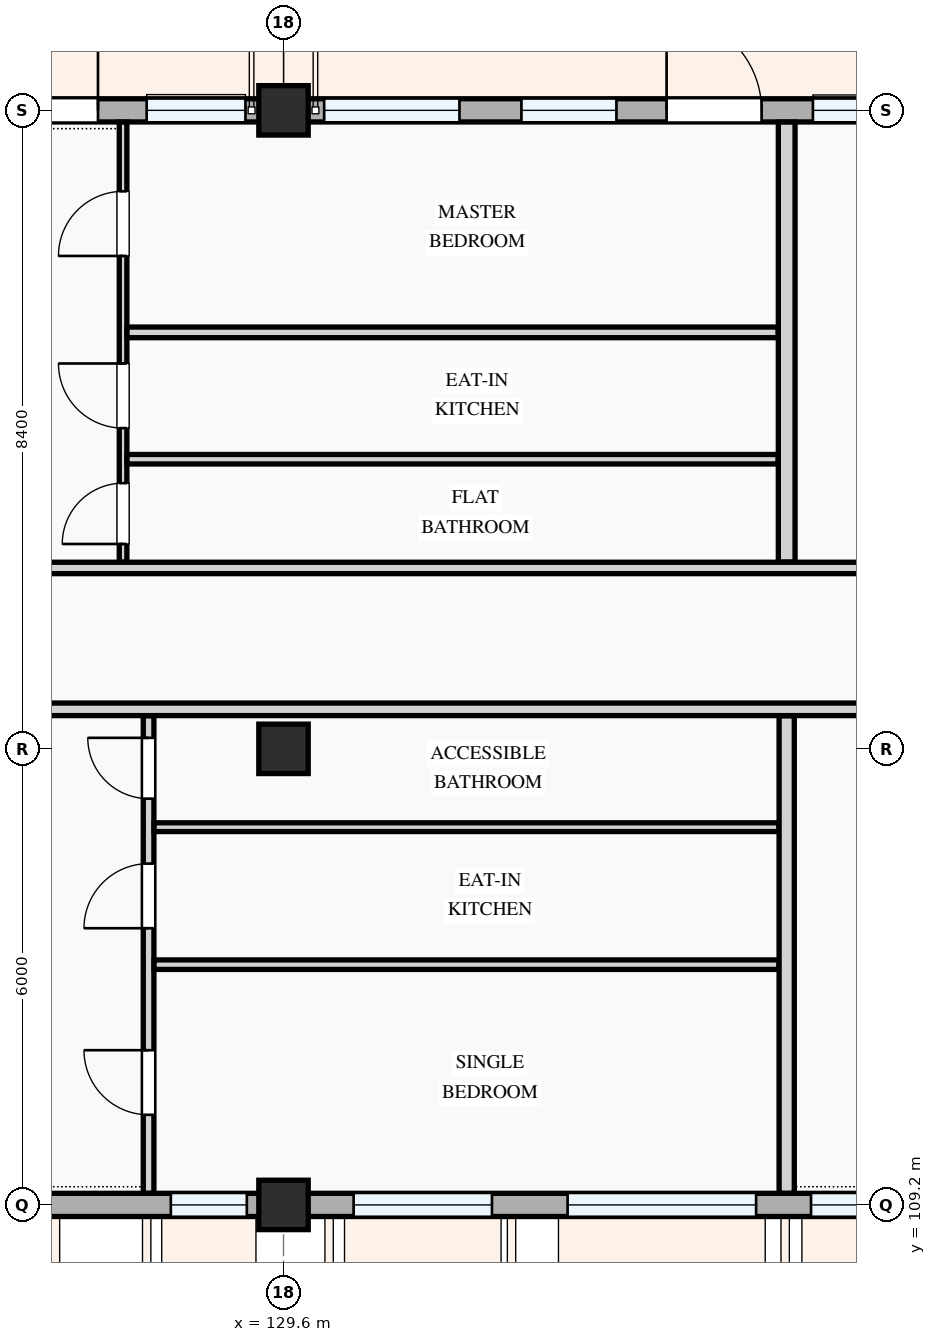
"""IFC4 building model, lengths in metres.
Left out: names, types, materials, properties, quantities, classifications, styles, units other than length and angle.
Written with IfcOpenShell. Run it as: python <this file> out.ifc"""

import sys

from ifc_helpers import new_model, si_unit, direction, frame, frame_2d, origin, origin_2d, place, context, subcontext, project, spatial, rectangle, extrude, element, fill, save


model = new_model("IFC4")
c1 = context("Model", 3, precision=1e-05, world=origin(), true_north=direction((0.0, 1.0)))
c2 = subcontext(c1, "Body", "Model", "MODEL_VIEW")
j1 = project(units=[si_unit("LENGTHUNIT", "METRE"), si_unit("PLANEANGLEUNIT", "RADIAN")], contexts=[c1])
p1 = place(None, origin())
s1 = spatial("IfcSite", under=j1, at=p1, CompositionType="ELEMENT")
p2 = place(p1, origin())
s2 = spatial("IfcBuilding", under=s1, at=p2, CompositionType="ELEMENT")
p3 = place(p2, frame((0.0, 0.0, 21.3)))
s3 = spatial("IfcBuildingStorey", under=s2, at=p3, CompositionType="ELEMENT", Elevation=21.3)
for number, where, z_axis, x_axis in (
    (1, (129.6, 109.2, 0.0), (0.0, 0.0, 1.0), (1.0, 0.0, 0.0)),
    (2, (129.6, 115.2, 0.0), (0.0, 0.0, 1.0), (1.0, 0.0, 0.0)),
    (3, (129.6, 123.6, 0.0), (0.0, 0.0, 1.0), (1.0, 0.0, 0.0)),
):
    element("IfcColumn", number, at=place(p3, frame(where, z_axis=z_axis, x_axis=x_axis)), inside=s3, PredefinedType="COLUMN", context=c2, shape_type="SweptSolid", body=[
        extrude(rectangle(XDim=0.65, YDim=0.65, at=origin_2d()), origin(), (0.0, 0.0, 1.0), 3.3),
    ])
p4 = place(p3, frame((138.0, 123.6, 0.0), z_axis=(0.0, 0.0, 1.0), x_axis=(-1.0, 0.0, 0.0)))
e4 = element("IfcWall", 4, at=p4, inside=s3, PredefinedType="STANDARD", context=c2, shape_type="SweptSolid", body=[
    extrude(rectangle(XDim=8.4, YDim=0.305, at=frame_2d((4.2, 0.0))), origin(), (0.0, 0.0, 1.0), 2.345),
])
p5 = place(p4, frame((2.11, 0.0, 0.0)))
e5 = element("IfcOpeningElement", 5, at=p5, cuts=e4, PredefinedType="OPENING", context=c2, shape_type="SweptSolid", body=[
    extrude(rectangle(XDim=1.25, YDim=2.2, at=frame_2d((0.625, 1.1))), frame((0.0, 0.163, 0.0), z_axis=(0.0, -1.0, 0.0), x_axis=(1.0, 0.0, 0.0)), (0.0, 0.0, 1.0), 0.325),
])
p6 = place(p4, frame((0.535, 0.0, 0.78)))
e6 = element("IfcOpeningElement", 6, at=p6, cuts=e4, PredefinedType="OPENING", context=c2, shape_type="SweptSolid", body=[
    extrude(rectangle(XDim=0.9, YDim=1.2, at=frame_2d((0.45, 0.6))), frame((0.0, 0.163, 0.0), z_axis=(0.0, -1.0, 0.0), x_axis=(1.0, 0.0, 0.0)), (0.0, 0.0, 1.0), 0.325),
])
p7 = place(p4, frame((4.02, 0.0, 0.78)))
e7 = element("IfcOpeningElement", 7, at=p7, cuts=e4, PredefinedType="OPENING", context=c2, shape_type="SweptSolid", body=[
    extrude(rectangle(XDim=1.25, YDim=1.3, at=frame_2d((0.625, 0.65))), frame((0.0, 0.163, 0.0), z_axis=(0.0, -1.0, 0.0), x_axis=(1.0, 0.0, 0.0)), (0.0, 0.0, 1.0), 0.325),
])
p8 = place(p4, frame((6.085, 0.0, 0.78)))
e8 = element("IfcOpeningElement", 8, at=p8, cuts=e4, PredefinedType="OPENING", context=c2, shape_type="SweptSolid", body=[
    extrude(rectangle(XDim=1.78, YDim=1.42, at=frame_2d((0.89, 0.71))), frame((0.0, 0.163, 0.0), z_axis=(0.0, -1.0, 0.0), x_axis=(1.0, 0.0, 0.0)), (0.0, 0.0, 1.0), 0.325),
])
p9 = place(p3, frame((129.6, 123.6, 0.0), z_axis=(0.0, 0.0, 1.0), x_axis=(-1.0, 0.0, 0.0)))
e9 = element("IfcWall", 9, at=p9, inside=s3, PredefinedType="STANDARD", context=c2, shape_type="SweptSolid", body=[
    extrude(rectangle(XDim=6.0, YDim=0.305, at=frame_2d((3.0, 0.0))), origin(), (0.0, 0.0, 1.0), 2.445),
])
p10 = place(p9, frame((2.441, 0.0, 0.0)))
e10 = element("IfcOpeningElement", 10, at=p10, cuts=e9, PredefinedType="OPENING", context=c2, shape_type="SweptSolid", body=[
    extrude(rectangle(XDim=1.3, YDim=2.15, at=frame_2d((0.65, 1.075))), frame((0.0, 0.163, 0.0), z_axis=(0.0, -1.0, 0.0), x_axis=(1.0, 0.0, 0.0)), (0.0, 0.0, 1.0), 0.325),
])
p11 = place(p9, frame((0.5, 0.0, 0.78)))
e11 = element("IfcOpeningElement", 11, at=p11, cuts=e9, PredefinedType="OPENING", context=c2, shape_type="SweptSolid", body=[
    extrude(rectangle(XDim=1.3, YDim=1.4, at=frame_2d((0.65, 0.7))), frame((0.0, 0.163, 0.0), z_axis=(0.0, -1.0, 0.0), x_axis=(1.0, 0.0, 0.0)), (0.0, 0.0, 1.0), 0.325),
])
p12 = place(p9, frame((4.2, 0.0, 0.78)))
e12 = element("IfcOpeningElement", 12, at=p12, cuts=e9, PredefinedType="OPENING", context=c2, shape_type="SweptSolid", body=[
    extrude(rectangle(XDim=1.2, YDim=1.5, at=frame_2d((0.6, 0.75))), frame((0.0, 0.163, 0.0), z_axis=(0.0, -1.0, 0.0), x_axis=(1.0, 0.0, 0.0)), (0.0, 0.0, 1.0), 0.325),
])
p13 = place(p3, frame((123.6, 109.2, 0.0), z_axis=(0.0, 0.0, 1.0), x_axis=(1.0, 0.0, 0.0)))
e13 = element("IfcWall", 13, at=p13, inside=s3, PredefinedType="STANDARD", context=c2, shape_type="SweptSolid", body=[
    extrude(rectangle(XDim=6.0, YDim=0.305, at=frame_2d((3.0, 0.0))), origin(), (0.0, 0.0, 1.0), 2.475),
])
p14 = place(p13, frame((1.683, 0.0, 0.78)))
e14 = element("IfcOpeningElement", 14, at=p14, cuts=e13, PredefinedType="OPENING", context=c2, shape_type="SweptSolid", body=[
    extrude(rectangle(XDim=1.05, YDim=1.2, at=frame_2d((0.525, 0.6))), frame((0.0, 0.163, 0.0), z_axis=(0.0, -1.0, 0.0), x_axis=(1.0, 0.0, 0.0)), (0.0, 0.0, 1.0), 0.325),
])
p15 = place(p13, frame((4.518, 0.0, 0.78)))
e15 = element("IfcOpeningElement", 15, at=p15, cuts=e13, PredefinedType="OPENING", context=c2, shape_type="SweptSolid", body=[
    extrude(rectangle(XDim=1.0, YDim=1.25, at=frame_2d((0.5, 0.625))), frame((0.0, 0.163, 0.0), z_axis=(0.0, -1.0, 0.0), x_axis=(1.0, 0.0, 0.0)), (0.0, 0.0, 1.0), 0.325),
])
p16 = place(p3, frame((129.6, 109.2, 0.0), z_axis=(0.0, 0.0, 1.0), x_axis=(1.0, 0.0, 0.0)))
e16 = element("IfcWall", 16, at=p16, inside=s3, PredefinedType="STANDARD", context=c2, shape_type="SweptSolid", body=[
    extrude(rectangle(XDim=8.4, YDim=0.305, at=frame_2d((4.2, 0.0))), origin(), (0.0, 0.0, 1.0), 2.375),
])
p17 = place(p16, frame((0.923, 0.0, 0.78)))
e17 = element("IfcOpeningElement", 17, at=p17, cuts=e16, PredefinedType="OPENING", context=c2, shape_type="SweptSolid", body=[
    extrude(rectangle(XDim=1.82, YDim=1.46, at=frame_2d((0.91, 0.73))), frame((0.0, 0.163, 0.0), z_axis=(0.0, -1.0, 0.0), x_axis=(1.0, 0.0, 0.0)), (0.0, 0.0, 1.0), 0.325),
])
p18 = place(p16, frame((3.738, 0.0, 0.78)))
e18 = element("IfcOpeningElement", 18, at=p18, cuts=e16, PredefinedType="OPENING", context=c2, shape_type="SweptSolid", body=[
    extrude(rectangle(XDim=2.48, YDim=1.46, at=frame_2d((1.24, 0.73))), frame((0.0, 0.163, 0.0), z_axis=(0.0, -1.0, 0.0), x_axis=(1.0, 0.0, 0.0)), (0.0, 0.0, 1.0), 0.325),
])
p19 = place(p16, frame((6.94, 0.0, 0.78)))
e19 = element("IfcOpeningElement", 19, at=p19, cuts=e16, PredefinedType="OPENING", context=c2, shape_type="SweptSolid", body=[
    extrude(rectangle(XDim=0.95, YDim=1.15, at=frame_2d((0.475, 0.575))), frame((0.0, 0.163, 0.0), z_axis=(0.0, -1.0, 0.0), x_axis=(1.0, 0.0, 0.0)), (0.0, 0.0, 1.0), 0.325),
])
p20 = place(p3, frame((127.825, 109.354, 0.0), z_axis=(0.0, 0.0, 1.0), x_axis=(0.0, 1.0, 0.0)))
e20 = element("IfcWall", 20, at=p20, inside=s3, PredefinedType="PARTITIONING", context=c2, shape_type="SweptSolid", body=[
    extrude(rectangle(XDim=6.281, YDim=0.14, at=frame_2d((3.141, 0.0))), origin(), (0.0, 0.0, 1.0), 3.0),
])
p21 = place(p20, frame((1.031, 0.0, 0.0)))
e21 = element("IfcOpeningElement", 21, at=p21, cuts=e20, PredefinedType="OPENING", context=c2, shape_type="SweptSolid", body=[
    extrude(rectangle(XDim=0.85, YDim=2.1, at=frame_2d((0.425, 1.05))), frame((0.0, 0.08, 0.0), z_axis=(0.0, -1.0, 0.0), x_axis=(1.0, 0.0, 0.0)), (0.0, 0.0, 1.0), 0.16),
])
p22 = place(p20, frame((3.486, 0.0, 0.0)))
e22 = element("IfcOpeningElement", 22, at=p22, cuts=e20, PredefinedType="OPENING", context=c2, shape_type="SweptSolid", body=[
    extrude(rectangle(XDim=0.85, YDim=2.1, at=frame_2d((0.425, 1.05))), frame((0.0, 0.08, 0.0), z_axis=(0.0, -1.0, 0.0), x_axis=(1.0, 0.0, 0.0)), (0.0, 0.0, 1.0), 0.16),
])
p23 = place(p20, frame((5.19, 0.0, 0.0)))
e23 = element("IfcOpeningElement", 23, at=p23, cuts=e20, PredefinedType="OPENING", context=c2, shape_type="SweptSolid", body=[
    extrude(rectangle(XDim=0.8, YDim=2.1, at=frame_2d((0.4, 1.05))), frame((0.0, 0.08, 0.0), z_axis=(0.0, -1.0, 0.0), x_axis=(1.0, 0.0, 0.0)), (0.0, 0.0, 1.0), 0.16),
])
p24 = place(p3, frame((127.897, 112.361, 0.0), z_axis=(0.0, 0.0, 1.0), x_axis=(1.0, 0.0, 0.0)))
e24 = element("IfcWall", 24, at=p24, inside=s3, PredefinedType="PARTITIONING", context=c2, shape_type="SweptSolid", body=[
    extrude(rectangle(XDim=8.221, YDim=0.125, at=frame_2d((4.11, 0.0))), origin(), (0.0, 0.0, 1.0), 3.0),
])
p25 = place(p3, frame((127.897, 114.17, 0.0), z_axis=(0.0, 0.0, 1.0), x_axis=(1.0, 0.0, 0.0)))
e25 = element("IfcWall", 25, at=p25, inside=s3, PredefinedType="PARTITIONING", context=c2, shape_type="SweptSolid", body=[
    extrude(rectangle(XDim=8.221, YDim=0.115, at=frame_2d((4.11, 0.0))), origin(), (0.0, 0.0, 1.0), 3.0),
])
p26 = place(p3, frame((127.489, 117.657, 0.0), z_axis=(0.0, 0.0, 1.0), x_axis=(0.0, 1.0, 0.0)))
e26 = element("IfcWall", 26, at=p26, inside=s3, PredefinedType="PARTITIONING", context=c2, shape_type="SweptSolid", body=[
    extrude(rectangle(XDim=5.789, YDim=0.1, at=frame_2d((2.894, 0.0))), origin(), (0.0, 0.0, 1.0), 3.0),
])
p27 = place(p26, frame((0.238, 0.0, 0.0)))
e27 = element("IfcOpeningElement", 27, at=p27, cuts=e26, PredefinedType="OPENING", context=c2, shape_type="SweptSolid", body=[
    extrude(rectangle(XDim=0.8, YDim=2.1, at=frame_2d((0.4, 1.05))), frame((0.0, 0.06, 0.0), z_axis=(0.0, -1.0, 0.0), x_axis=(1.0, 0.0, 0.0)), (0.0, 0.0, 1.0), 0.12),
])
p28 = place(p26, frame((1.763, 0.0, 0.0)))
e28 = element("IfcOpeningElement", 28, at=p28, cuts=e26, PredefinedType="OPENING", context=c2, shape_type="SweptSolid", body=[
    extrude(rectangle(XDim=0.85, YDim=2.1, at=frame_2d((0.425, 1.05))), frame((0.0, 0.06, 0.0), z_axis=(0.0, -1.0, 0.0), x_axis=(1.0, 0.0, 0.0)), (0.0, 0.0, 1.0), 0.12),
])
p29 = place(p26, frame((4.028, 0.0, 0.0)))
e29 = element("IfcOpeningElement", 29, at=p29, cuts=e26, PredefinedType="OPENING", context=c2, shape_type="SweptSolid", body=[
    extrude(rectangle(XDim=0.85, YDim=2.1, at=frame_2d((0.425, 1.05))), frame((0.0, 0.06, 0.0), z_axis=(0.0, -1.0, 0.0), x_axis=(1.0, 0.0, 0.0)), (0.0, 0.0, 1.0), 0.12),
])
p30 = place(p3, frame((127.541, 120.679, 0.0), z_axis=(0.0, 0.0, 1.0), x_axis=(1.0, 0.0, 0.0)))
e30 = element("IfcWall", 30, at=p30, inside=s3, PredefinedType="PARTITIONING", context=c2, shape_type="SweptSolid", body=[
    extrude(rectangle(XDim=8.567, YDim=0.14, at=frame_2d((4.283, 0.0))), origin(), (0.0, 0.0, 1.0), 3.0),
])
p31 = place(p3, frame((127.541, 119.01, 0.0), z_axis=(0.0, 0.0, 1.0), x_axis=(1.0, 0.0, 0.0)))
e31 = element("IfcWall", 31, at=p31, inside=s3, PredefinedType="PARTITIONING", context=c2, shape_type="SweptSolid", body=[
    extrude(rectangle(XDim=8.567, YDim=0.125, at=frame_2d((4.283, 0.0))), origin(), (0.0, 0.0, 1.0), 3.0),
])
p32 = place(p3, frame((136.22, 109.354, 0.0), z_axis=(0.0, 0.0, 1.0), x_axis=(0.0, 1.0, 0.0)))
e32 = element("IfcWall", 32, at=p32, inside=s3, PredefinedType="PARTITIONING", context=c2, shape_type="SweptSolid", body=[
    extrude(rectangle(XDim=6.281, YDim=0.2, at=frame_2d((3.141, 0.0))), origin(), (0.0, 0.0, 1.0), 3.0),
])
p33 = place(p3, frame((136.22, 117.657, 0.0), z_axis=(0.0, 0.0, 1.0), x_axis=(0.0, 1.0, 0.0)))
e33 = element("IfcWall", 33, at=p33, inside=s3, PredefinedType="PARTITIONING", context=c2, shape_type="SweptSolid", body=[
    extrude(rectangle(XDim=5.789, YDim=0.22, at=frame_2d((2.894, 0.0))), origin(), (0.0, 0.0, 1.0), 3.0),
])
p34 = place(p3, frame((80.554, 115.72, 0.0), z_axis=(0.0, 0.0, 1.0), x_axis=(1.0, 0.0, 0.0)))
e34 = element("IfcWall", 34, at=p34, inside=s3, PredefinedType="PARTITIONING", context=c2, shape_type="SweptSolid", body=[
    extrude(rectangle(XDim=69.496, YDim=0.165, at=frame_2d((34.748, 0.0))), origin(), (0.0, 0.0, 1.0), 3.0),
])
p35 = place(p34, frame((2.359, 0.0, 0.0)))
e35 = element("IfcOpeningElement", 35, at=p35, cuts=e34, PredefinedType="OPENING", context=c2, shape_type="SweptSolid", body=[
    extrude(rectangle(XDim=0.96, YDim=2.12, at=frame_2d((0.48, 1.06))), frame((0.0, 0.093, 0.0), z_axis=(0.0, -1.0, 0.0), x_axis=(1.0, 0.0, 0.0)), (0.0, 0.0, 1.0), 0.185),
])
p36 = place(p34, frame((23.96, 0.0, 0.0)))
e36 = element("IfcOpeningElement", 36, at=p36, cuts=e34, PredefinedType="OPENING", context=c2, shape_type="SweptSolid", body=[
    extrude(rectangle(XDim=0.92, YDim=2.1, at=frame_2d((0.46, 1.05))), frame((0.0, 0.093, 0.0), z_axis=(0.0, -1.0, 0.0), x_axis=(1.0, 0.0, 0.0)), (0.0, 0.0, 1.0), 0.185),
])
p37 = place(p34, frame((39.125, 0.0, 0.0)))
e37 = element("IfcOpeningElement", 37, at=p37, cuts=e34, PredefinedType="OPENING", context=c2, shape_type="SweptSolid", body=[
    extrude(rectangle(XDim=0.92, YDim=2.1, at=frame_2d((0.46, 1.05))), frame((0.0, 0.093, 0.0), z_axis=(0.0, -1.0, 0.0), x_axis=(1.0, 0.0, 0.0)), (0.0, 0.0, 1.0), 0.185),
])
p38 = place(p34, frame((59.901, 0.0, 0.0)))
e38 = element("IfcOpeningElement", 38, at=p38, cuts=e34, PredefinedType="OPENING", context=c2, shape_type="SweptSolid", body=[
    extrude(rectangle(XDim=0.92, YDim=2.1, at=frame_2d((0.46, 1.05))), frame((0.0, 0.093, 0.0), z_axis=(0.0, -1.0, 0.0), x_axis=(1.0, 0.0, 0.0)), (0.0, 0.0, 1.0), 0.185),
])
p39 = place(p3, frame((80.554, 117.58, 0.0), z_axis=(0.0, 0.0, 1.0), x_axis=(1.0, 0.0, 0.0)))
e39 = element("IfcWall", 39, at=p39, inside=s3, PredefinedType="PARTITIONING", context=c2, shape_type="SweptSolid", body=[
    extrude(rectangle(XDim=71.986, YDim=0.15, at=frame_2d((35.993, 0.0))), origin(), (0.0, 0.0, 1.0), 3.0),
])
p40 = place(p39, frame((2.254, 0.0, 0.0)))
e40 = element("IfcOpeningElement", 40, at=p40, cuts=e39, PredefinedType="OPENING", context=c2, shape_type="SweptSolid", body=[
    extrude(rectangle(XDim=0.92, YDim=2.1, at=frame_2d((0.46, 1.05))), frame((0.0, 0.085, 0.0), z_axis=(0.0, -1.0, 0.0), x_axis=(1.0, 0.0, 0.0)), (0.0, 0.0, 1.0), 0.17),
])
p41 = place(p39, frame((23.937, 0.0, 0.0)))
e41 = element("IfcOpeningElement", 41, at=p41, cuts=e39, PredefinedType="OPENING", context=c2, shape_type="SweptSolid", body=[
    extrude(rectangle(XDim=0.96, YDim=2.12, at=frame_2d((0.48, 1.06))), frame((0.0, 0.085, 0.0), z_axis=(0.0, -1.0, 0.0), x_axis=(1.0, 0.0, 0.0)), (0.0, 0.0, 1.0), 0.17),
])
p42 = place(p39, frame((39.125, 0.0, 0.0)))
e42 = element("IfcOpeningElement", 42, at=p42, cuts=e39, PredefinedType="OPENING", context=c2, shape_type="SweptSolid", body=[
    extrude(rectangle(XDim=0.92, YDim=2.1, at=frame_2d((0.46, 1.05))), frame((0.0, 0.085, 0.0), z_axis=(0.0, -1.0, 0.0), x_axis=(1.0, 0.0, 0.0)), (0.0, 0.0, 1.0), 0.17),
])
p43 = place(p39, frame((59.922, 0.0, 0.0)))
e43 = element("IfcOpeningElement", 43, at=p43, cuts=e39, PredefinedType="OPENING", context=c2, shape_type="SweptSolid", body=[
    extrude(rectangle(XDim=0.92, YDim=2.1, at=frame_2d((0.46, 1.05))), frame((0.0, 0.085, 0.0), z_axis=(0.0, -1.0, 0.0), x_axis=(1.0, 0.0, 0.0)), (0.0, 0.0, 1.0), 0.17),
])
p44 = place(p5, frame((1.25, 0.0, 0.0), z_axis=(0.0, 0.0, 1.0), x_axis=(-1.0, 0.0, 0.0)))
e44 = element("IfcDoor", 44, at=p44, inside=s3, OperationType="SINGLE_SWING_LEFT", PredefinedType="DOOR", context=c2, shape_type="SweptSolid", body=[
    extrude(rectangle(XDim=1.25, YDim=2.2, at=frame_2d((0.625, 1.1))), frame((0.0, 0.025, 0.0), z_axis=(0.0, -1.0, 0.0), x_axis=(1.0, 0.0, 0.0)), (0.0, 0.0, 1.0), 0.05),
])
fill(e5, e44)
p45 = place(p6, origin())
e45 = element("IfcWindow", 45, at=p45, inside=s3, PartitioningType="SINGLE_PANEL", PredefinedType="WINDOW", context=c2, shape_type="SweptSolid", body=[
    extrude(rectangle(XDim=0.9, YDim=1.2, at=frame_2d((0.45, 0.6))), frame((0.0, 0.03, 0.0), z_axis=(0.0, -1.0, 0.0), x_axis=(1.0, 0.0, 0.0)), (0.0, 0.0, 1.0), 0.06),
])
fill(e6, e45)
p46 = place(p7, origin())
e46 = element("IfcWindow", 46, at=p46, inside=s3, PartitioningType="SINGLE_PANEL", PredefinedType="WINDOW", context=c2, shape_type="SweptSolid", body=[
    extrude(rectangle(XDim=1.25, YDim=1.3, at=frame_2d((0.625, 0.65))), frame((0.0, 0.03, 0.0), z_axis=(0.0, -1.0, 0.0), x_axis=(1.0, 0.0, 0.0)), (0.0, 0.0, 1.0), 0.06),
])
fill(e7, e46)
p47 = place(p8, origin())
e47 = element("IfcWindow", 47, at=p47, inside=s3, PartitioningType="DOUBLE_PANEL_VERTICAL", PredefinedType="WINDOW", context=c2, shape_type="SweptSolid", body=[
    extrude(rectangle(XDim=1.78, YDim=1.42, at=frame_2d((0.89, 0.71))), frame((0.0, 0.03, 0.0), z_axis=(0.0, -1.0, 0.0), x_axis=(1.0, 0.0, 0.0)), (0.0, 0.0, 1.0), 0.06),
])
fill(e8, e47)
p48 = place(p10, frame((1.3, 0.0, 0.0), z_axis=(0.0, 0.0, 1.0), x_axis=(-1.0, 0.0, 0.0)))
e48 = element("IfcDoor", 48, at=p48, inside=s3, OperationType="SINGLE_SWING_RIGHT", PredefinedType="DOOR", context=c2, shape_type="SweptSolid", body=[
    extrude(rectangle(XDim=1.3, YDim=2.15, at=frame_2d((0.65, 1.075))), frame((0.0, 0.025, 0.0), z_axis=(0.0, -1.0, 0.0), x_axis=(1.0, 0.0, 0.0)), (0.0, 0.0, 1.0), 0.05),
])
fill(e10, e48)
p49 = place(p11, origin())
e49 = element("IfcWindow", 49, at=p49, inside=s3, PartitioningType="SINGLE_PANEL", PredefinedType="WINDOW", context=c2, shape_type="SweptSolid", body=[
    extrude(rectangle(XDim=1.3, YDim=1.4, at=frame_2d((0.65, 0.7))), frame((0.0, 0.03, 0.0), z_axis=(0.0, -1.0, 0.0), x_axis=(1.0, 0.0, 0.0)), (0.0, 0.0, 1.0), 0.06),
])
fill(e11, e49)
p50 = place(p15, origin())
e50 = element("IfcWindow", 50, at=p50, inside=s3, PartitioningType="SINGLE_PANEL", PredefinedType="WINDOW", context=c2, shape_type="SweptSolid", body=[
    extrude(rectangle(XDim=1.0, YDim=1.25, at=frame_2d((0.5, 0.625))), frame((0.0, 0.03, 0.0), z_axis=(0.0, -1.0, 0.0), x_axis=(1.0, 0.0, 0.0)), (0.0, 0.0, 1.0), 0.06),
])
fill(e15, e50)
p51 = place(p17, origin())
e51 = element("IfcWindow", 51, at=p51, inside=s3, PartitioningType="DOUBLE_PANEL_VERTICAL", PredefinedType="WINDOW", context=c2, shape_type="SweptSolid", body=[
    extrude(rectangle(XDim=1.82, YDim=1.46, at=frame_2d((0.91, 0.73))), frame((0.0, 0.03, 0.0), z_axis=(0.0, -1.0, 0.0), x_axis=(1.0, 0.0, 0.0)), (0.0, 0.0, 1.0), 0.06),
])
fill(e17, e51)
p52 = place(p18, origin())
e52 = element("IfcWindow", 52, at=p52, inside=s3, PartitioningType="DOUBLE_PANEL_VERTICAL", PredefinedType="WINDOW", context=c2, shape_type="SweptSolid", body=[
    extrude(rectangle(XDim=2.48, YDim=1.46, at=frame_2d((1.24, 0.73))), frame((0.0, 0.03, 0.0), z_axis=(0.0, -1.0, 0.0), x_axis=(1.0, 0.0, 0.0)), (0.0, 0.0, 1.0), 0.06),
])
fill(e18, e52)
p53 = place(p19, origin())
e53 = element("IfcWindow", 53, at=p53, inside=s3, PartitioningType="SINGLE_PANEL", PredefinedType="WINDOW", context=c2, shape_type="SweptSolid", body=[
    extrude(rectangle(XDim=0.95, YDim=1.15, at=frame_2d((0.475, 0.575))), frame((0.0, 0.03, 0.0), z_axis=(0.0, -1.0, 0.0), x_axis=(1.0, 0.0, 0.0)), (0.0, 0.0, 1.0), 0.06),
])
fill(e19, e53)
p54 = place(p21, origin())
e54 = element("IfcDoor", 54, at=p54, inside=s3, OperationType="SINGLE_SWING_RIGHT", PredefinedType="DOOR", context=c2, shape_type="SweptSolid", body=[
    extrude(rectangle(XDim=0.85, YDim=2.1, at=frame_2d((0.425, 1.05))), frame((0.0, 0.025, 0.0), z_axis=(0.0, -1.0, 0.0), x_axis=(1.0, 0.0, 0.0)), (0.0, 0.0, 1.0), 0.05),
])
fill(e21, e54)
p55 = place(p22, origin())
e55 = element("IfcDoor", 55, at=p55, inside=s3, OperationType="SINGLE_SWING_LEFT", PredefinedType="DOOR", context=c2, shape_type="SweptSolid", body=[
    extrude(rectangle(XDim=0.85, YDim=2.1, at=frame_2d((0.425, 1.05))), frame((0.0, 0.025, 0.0), z_axis=(0.0, -1.0, 0.0), x_axis=(1.0, 0.0, 0.0)), (0.0, 0.0, 1.0), 0.05),
])
fill(e22, e55)
p56 = place(p23, origin())
e56 = element("IfcDoor", 56, at=p56, inside=s3, OperationType="SINGLE_SWING_RIGHT", PredefinedType="DOOR", context=c2, shape_type="SweptSolid", body=[
    extrude(rectangle(XDim=0.8, YDim=2.1, at=frame_2d((0.4, 1.05))), frame((0.0, 0.025, 0.0), z_axis=(0.0, -1.0, 0.0), x_axis=(1.0, 0.0, 0.0)), (0.0, 0.0, 1.0), 0.05),
])
fill(e23, e56)
p57 = place(p27, origin())
e57 = element("IfcDoor", 57, at=p57, inside=s3, OperationType="SINGLE_SWING_LEFT", PredefinedType="DOOR", context=c2, shape_type="SweptSolid", body=[
    extrude(rectangle(XDim=0.8, YDim=2.1, at=frame_2d((0.4, 1.05))), frame((0.0, 0.025, 0.0), z_axis=(0.0, -1.0, 0.0), x_axis=(1.0, 0.0, 0.0)), (0.0, 0.0, 1.0), 0.05),
])
fill(e27, e57)
p58 = place(p28, origin())
e58 = element("IfcDoor", 58, at=p58, inside=s3, OperationType="SINGLE_SWING_RIGHT", PredefinedType="DOOR", context=c2, shape_type="SweptSolid", body=[
    extrude(rectangle(XDim=0.85, YDim=2.1, at=frame_2d((0.425, 1.05))), frame((0.0, 0.025, 0.0), z_axis=(0.0, -1.0, 0.0), x_axis=(1.0, 0.0, 0.0)), (0.0, 0.0, 1.0), 0.05),
])
fill(e28, e58)
p59 = place(p29, origin())
e59 = element("IfcDoor", 59, at=p59, inside=s3, OperationType="SINGLE_SWING_LEFT", PredefinedType="DOOR", context=c2, shape_type="SweptSolid", body=[
    extrude(rectangle(XDim=0.85, YDim=2.1, at=frame_2d((0.425, 1.05))), frame((0.0, 0.025, 0.0), z_axis=(0.0, -1.0, 0.0), x_axis=(1.0, 0.0, 0.0)), (0.0, 0.0, 1.0), 0.05),
])
fill(e29, e59)
save(model, sys.argv[1])
